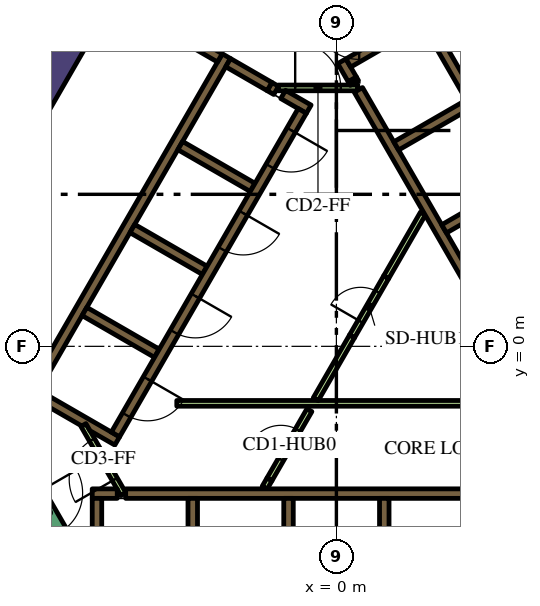
"""IFC4 building model, lengths in metres.
Left out: names, types, materials, properties, quantities, classifications, styles, units other than length and angle.
Written with IfcOpenShell. Run it as: python <this file> out.ifc"""

import sys

from ifc_helpers import new_model, si_unit, direction, frame, frame_2d, origin, place, context, subcontext, project, spatial, polyline, rectangle, outline, extrude, element, fill, save


model = new_model("IFC4")
c1 = context("Model", 3, precision=1e-05, world=origin(), true_north=direction((0.0, 1.0)))
c2 = subcontext(c1, "Body", "Model", "MODEL_VIEW")
j1 = project(units=[si_unit("LENGTHUNIT", "METRE"), si_unit("PLANEANGLEUNIT", "RADIAN")], contexts=[c1])
p1 = place(None, origin())
s1 = spatial("IfcSite", under=j1, at=p1, CompositionType="ELEMENT")
p2 = place(p1, origin())
s2 = spatial("IfcBuilding", under=s1, at=p2, CompositionType="ELEMENT")
p3 = place(p2, frame((0.0, 0.0, 175.2)))
s3 = spatial("IfcBuildingStorey", under=s2, at=p3, CompositionType="ELEMENT", Elevation=175.2)
p4 = place(p3, frame((8.279, 5.761, 0.0), z_axis=(0.0, 0.0, 1.0), x_axis=(-0.500010359015, 0.866019422922, 0.0)))
e1 = element("IfcWall", 1, at=p4, inside=s3, PredefinedType="SOLIDWALL", context=c2, shape_type="SweptSolid", body=[
    extrude(rectangle(XDim=12.528, YDim=0.8, at=frame_2d((6.264, 0.0))), origin(), (0.0, 0.0, 1.0), 4.2),
])
p5 = place(p3, frame((-12.668, -1.842, 0.0), z_axis=(0.0, 0.0, 1.0), x_axis=(0.500003640647, 0.866023301845, 0.0)))
e2 = element("IfcWall", 2, at=p5, inside=s3, PredefinedType="SOLIDWALL", context=c2, shape_type="SweptSolid", body=[
    extrude(rectangle(XDim=15.858, YDim=0.8, at=frame_2d((7.929, 0.0))), origin(), (0.0, 0.0, 1.0), 4.2),
])
p6 = place(p3, frame((-5.545, -3.875, 0.0), z_axis=(0.0, 0.0, 1.0), x_axis=(1.0, 0.0, 0.0)))
e3 = element("IfcWall", 3, at=p6, inside=s3, PredefinedType="SOLIDWALL", context=c2, shape_type="SweptSolid", body=[
    extrude(rectangle(XDim=11.97, YDim=0.25, at=frame_2d((5.985, 0.0))), origin(), (0.0, 0.0, 1.0), 4.2),
])
p7 = place(p3, frame((-6.425, -3.875, 0.0), z_axis=(0.0, 0.0, 1.0), x_axis=(1.0, 0.0, 0.0)))
e4 = element("IfcWall", 4, at=p7, inside=s3, PredefinedType="SOLIDWALL", context=c2, shape_type="SweptSolid", body=[
    extrude(rectangle(XDim=0.658, YDim=0.25, at=frame_2d((0.329, 0.0))), origin(), (0.0, 0.0, 1.0), 4.2),
])
for number, where, z_axis, x_axis in (
    (5, (1.26, -4.0, 0.0), (0.0, 0.0, 1.0), (0.0, -1.0, 0.0)),
    (6, (-1.26, -4.0, 0.0), (0.0, 0.0, 1.0), (0.0, -1.0, 0.0)),
    (7, (-3.78, -4.0, 0.0), (0.0, 0.0, 1.0), (0.0, -1.0, 0.0)),
):
    element("IfcWall", number, at=place(p3, frame(where, z_axis=z_axis, x_axis=x_axis)), inside=s3, PredefinedType="SOLIDWALL", context=c2, shape_type="SweptSolid", body=[
        extrude(rectangle(XDim=2.2, YDim=0.25, at=frame_2d((1.1, 0.0))), origin(), (0.0, 0.0, 1.0), 4.2),
    ])
p8 = place(p3, frame((-6.3, -7.125, 0.0), z_axis=(0.0, 0.0, 1.0), x_axis=(0.0, 1.0, 0.0)))
e8 = element("IfcWall", 8, at=p8, inside=s3, PredefinedType="SOLIDWALL", context=c2, shape_type="SweptSolid", body=[
    extrude(rectangle(XDim=3.125, YDim=0.25, at=frame_2d((1.562, 0.0))), origin(), (0.0, 0.0, 1.0), 4.2),
])
p9 = place(p3, frame((0.473, 6.93, 0.0), z_axis=(0.0, 0.0, 1.0), x_axis=(-0.49972245349, 0.866185586049, 0.0)))
e9 = element("IfcWall", 9, at=p9, inside=s3, PredefinedType="SOLIDWALL", context=c2, shape_type="SweptSolid", body=[
    extrude(rectangle(XDim=0.11, YDim=0.25, at=frame_2d((0.055, 0.0))), origin(), (0.0, 0.0, 1.0), 4.2),
])
p10 = place(p3, frame((6.568, -3.627, 0.0), z_axis=(0.0, 0.0, 1.0), x_axis=(-0.499999455981, 0.866025717874, 0.0)))
e10 = element("IfcWall", 10, at=p10, inside=s3, PredefinedType="SOLIDWALL", context=c2, shape_type="SweptSolid", body=[
    extrude(rectangle(XDim=11.978, YDim=0.25, at=frame_2d((5.989, 0.0))), origin(), (0.0, 0.0, 1.0), 4.2),
])
p11 = place(p3, frame((0.417, 7.027, 0.0), z_axis=(0.0, 0.0, 1.0), x_axis=(-0.500210807569, 0.865903659763, 0.0)))
e11 = element("IfcWall", 11, at=p11, inside=s3, PredefinedType="SOLIDWALL", context=c2, shape_type="SweptSolid", body=[
    extrude(rectangle(XDim=0.548, YDim=0.25, at=frame_2d((0.274, 0.0))), origin(), (0.0, 0.0, 1.0), 4.2),
])
p12 = place(p3, frame((3.1, 9.064, 0.0), z_axis=(0.0, 0.0, 1.0), x_axis=(-0.866030133475, -0.499991807846, 0.0)))
e12 = element("IfcWall", 12, at=p12, inside=s3, PredefinedType="SOLIDWALL", context=c2, shape_type="SweptSolid", body=[
    extrude(rectangle(XDim=3.217, YDim=0.25, at=frame_2d((1.608, 0.0))), origin(), (0.0, 0.0, 1.0), 4.2),
])
p13 = place(p3, frame((1.574, 5.274, 0.0), z_axis=(0.0, 0.0, 1.0), x_axis=(0.866028486751, 0.499994660107, 0.0)))
e13 = element("IfcWall", 13, at=p13, inside=s3, PredefinedType="SOLIDWALL", context=c2, shape_type="SweptSolid", body=[
    extrude(rectangle(XDim=2.2, YDim=0.25, at=frame_2d((1.1, 0.0))), origin(), (0.0, 0.0, 1.0), 4.2),
])
p14 = place(p3, frame((2.834, 3.091, 0.0), z_axis=(0.0, 0.0, 1.0), x_axis=(0.866008176907, 0.50002983664, 0.0)))
e14 = element("IfcWall", 14, at=p14, inside=s3, PredefinedType="SOLIDWALL", context=c2, shape_type="SweptSolid", body=[
    extrude(rectangle(XDim=2.2, YDim=0.25, at=frame_2d((1.1, 0.0))), origin(), (0.0, 0.0, 1.0), 4.2),
])
p15 = place(p3, frame((-8.06, -1.311, 0.0), z_axis=(0.0, 0.0, 1.0), x_axis=(0.50000273126, 0.866023826885, 0.0)))
e15 = element("IfcWall", 15, at=p15, inside=s3, PredefinedType="SOLIDWALL", context=c2, shape_type="SweptSolid", body=[
    extrude(rectangle(XDim=10.33, YDim=0.25, at=frame_2d((5.165, 0.0))), origin(), (0.0, 0.0, 1.0), 4.2),
])
p16 = place(p3, frame((-1.758, 6.835, 0.0), z_axis=(0.0, 0.0, 1.0), x_axis=(0.865982457891, -0.500074377092, 0.0)))
e16 = element("IfcWall", 16, at=p16, inside=s3, PredefinedType="SOLIDWALL", context=c2, shape_type="SweptSolid", body=[
    extrude(rectangle(XDim=0.2, YDim=0.25, at=frame_2d((0.1, 0.0))), origin(), (0.0, 0.0, 1.0), 4.2),
])
p17 = place(p3, frame((-1.76, 6.836, 0.0), z_axis=(0.0, 0.0, 1.0), x_axis=(-0.865952863304, 0.500125622755, 0.0)))
e17 = element("IfcWall", 17, at=p17, inside=s3, PredefinedType="SOLIDWALL", context=c2, shape_type="SweptSolid", body=[
    extrude(rectangle(XDim=1.258, YDim=0.25, at=frame_2d((0.629, 0.0))), origin(), (0.0, 0.0, 1.0), 4.2),
])
p18 = place(p3, frame((-0.728, 6.24, 0.0), z_axis=(0.0, 0.0, 1.0), x_axis=(-0.865955664968, 0.500120771724, 0.0)))
e18 = element("IfcWall", 18, at=p18, inside=s3, PredefinedType="SOLIDWALL", context=c2, shape_type="SweptSolid", body=[
    extrude(rectangle(XDim=0.778, YDim=0.25, at=frame_2d((0.389, 0.0))), origin(), (0.0, 0.0, 1.0), 4.2),
])
for number, where, z_axis, x_axis in (
    (19, (-2.204, 4.182, 0.0), (0.0, 0.0, 1.0), (-0.866, 0.5, 0.0)),
    (20, (-5.369, 3.1, 0.0), (0.0, 0.0, 1.0), (0.866, -0.5, 0.0)),
    (21, (-4.724, -0.182, 0.0), (0.0, 0.0, 1.0), (-0.866, 0.5, 0.0)),
):
    element("IfcWall", number, at=place(p3, frame(where, z_axis=z_axis, x_axis=x_axis)), inside=s3, PredefinedType="SOLIDWALL", context=c2, shape_type="SweptSolid", body=[
        extrude(rectangle(XDim=2.2, YDim=0.25, at=frame_2d((1.1, 0.0))), origin(), (0.0, 0.0, 1.0), 4.2),
    ])
p19 = place(p3, origin())
e22 = element("IfcWall", 22, at=p19, inside=s3, PredefinedType="SOLIDWALL", context=c2, shape_type="SweptSolid", body=[
    extrude(outline(polyline([(-5.922, -2.257), (-5.922, -2.257), (-5.705, -2.382), (-5.83, -2.598), (-6.483, -2.221), (-6.591, -2.033), (-6.591, -2.033), (-6.7, -2.096), (-7.952, -1.373), (-7.827, -1.156), (-5.922, -2.257)])), origin(), (0.0, 0.0, 1.0), 4.2),
])
p20 = place(p3, frame((-3.066, 7.59, 0.0), z_axis=(0.0, 0.0, 1.0), x_axis=(-0.866081358704, 0.49990307071, 0.0)))
e23 = element("IfcWall", 23, at=p20, inside=s3, PredefinedType="SOLIDWALL", context=c2, shape_type="SweptSolid", body=[
    extrude(rectangle(XDim=0.858, YDim=0.25, at=frame_2d((0.429, 0.0))), origin(), (0.0, 0.0, 1.0), 4.2),
])
p21 = place(p3, frame((-4.2, -1.5, 0.0), z_axis=(0.0, 0.0, 1.0), x_axis=(1.0, 0.0, 0.0)))
e24 = element("IfcWall", 24, at=p21, inside=s3, PredefinedType="PARTITIONING", context=c2, shape_type="SweptSolid", body=[
    extrude(rectangle(XDim=9.359, YDim=0.15, at=frame_2d((4.68, 0.0))), origin(), (0.0, 0.0, 1.0), 3.15),
])
p22 = place(p3, frame((-0.544, -1.393, 0.0), z_axis=(0.0, 0.0, 1.0), x_axis=(0.499928740635, 0.866066541489, 0.0)))
e25 = element("IfcWall", 25, at=p22, inside=s3, PredefinedType="PARTITIONING", context=c2, shape_type="SweptSolid", body=[
    extrude(rectangle(XDim=1.912, YDim=0.15, at=frame_2d((0.956, 0.0))), origin(), (0.0, 0.0, 1.0), 3.15),
])
p23 = place(p3, frame((1.312, 1.822, 0.0), z_axis=(0.0, 0.0, 1.0), x_axis=(0.500003549559, 0.866023354436, 0.0)))
e26 = element("IfcWall", 26, at=p23, inside=s3, PredefinedType="PARTITIONING", context=c2, shape_type="SweptSolid", body=[
    extrude(rectangle(XDim=1.93, YDim=0.15, at=frame_2d((0.965, 0.0))), origin(), (0.0, 0.0, 1.0), 3.15),
])
p24 = place(p3, frame((-1.887, -3.718, 0.0), z_axis=(0.0, 0.0, 1.0), x_axis=(0.500165633897, 0.865929753888, 0.0)))
e27 = element("IfcWall", 27, at=p24, inside=s3, PredefinedType="PARTITIONING", context=c2, shape_type="SweptSolid", body=[
    extrude(rectangle(XDim=0.254, YDim=0.15, at=frame_2d((0.127, 0.0))), origin(), (0.0, 0.0, 1.0), 3.15),
])
p25 = place(p3, frame((8.565, -2.185, 0.0), z_axis=(0.0, 0.0, 1.0), x_axis=(-0.499997954832, 0.866026584559, 0.0)))
e28 = element("IfcWall", 28, at=p25, inside=s3, PredefinedType="SOLIDWALL", context=c2, shape_type="SweptSolid", body=[
    extrude(rectangle(XDim=12.35, YDim=0.25, at=frame_2d((6.175, 0.0))), origin(), (0.0, 0.0, 1.0), 4.2),
])
p26 = place(p25, frame((0.585, 0.0, 0.0)))
e29 = element("IfcOpeningElement", 29, at=p26, cuts=e28, PredefinedType="OPENING", context=c2, shape_type="SweptSolid", body=[
    extrude(rectangle(XDim=1.1, YDim=2.1, at=frame_2d((0.55, 1.05))), frame((0.0, 0.135, 0.0), z_axis=(0.0, -1.0, 0.0), x_axis=(1.0, 0.0, 0.0)), (0.0, 0.0, 1.0), 0.27),
])
p27 = place(p3, frame((-0.898, 6.194, 0.0), z_axis=(0.0, 0.0, 1.0), x_axis=(-0.499996202215, -0.866027596426, 0.0)))
e30 = element("IfcWall", 30, at=p27, inside=s3, PredefinedType="SOLIDWALL", context=c2, shape_type="SweptSolid", body=[
    extrude(rectangle(XDim=9.83, YDim=0.25, at=frame_2d((4.915, 0.0))), origin(), (0.0, 0.0, 1.0), 4.2),
])
p28 = place(p27, frame((0.585, 0.0, 0.0)))
e31 = element("IfcOpeningElement", 31, at=p28, cuts=e30, PredefinedType="OPENING", context=c2, shape_type="SweptSolid", body=[
    extrude(rectangle(XDim=1.1, YDim=2.1, at=frame_2d((0.55, 1.05))), frame((0.0, 0.135, 0.0), z_axis=(0.0, -1.0, 0.0), x_axis=(1.0, 0.0, 0.0)), (0.0, 0.0, 1.0), 0.27),
])
p29 = place(p27, frame((3.105, 0.0, 0.0)))
e32 = element("IfcOpeningElement", 32, at=p29, cuts=e30, PredefinedType="OPENING", context=c2, shape_type="SweptSolid", body=[
    extrude(rectangle(XDim=1.1, YDim=2.1, at=frame_2d((0.55, 1.05))), frame((0.0, 0.135, 0.0), z_axis=(0.0, -1.0, 0.0), x_axis=(1.0, 0.0, 0.0)), (0.0, 0.0, 1.0), 0.27),
])
p30 = place(p27, frame((5.625, 0.0, 0.0)))
e33 = element("IfcOpeningElement", 33, at=p30, cuts=e30, PredefinedType="OPENING", context=c2, shape_type="SweptSolid", body=[
    extrude(rectangle(XDim=1.1, YDim=2.1, at=frame_2d((0.55, 1.05))), frame((0.0, 0.135, 0.0), z_axis=(0.0, -1.0, 0.0), x_axis=(1.0, 0.0, 0.0)), (0.0, 0.0, 1.0), 0.27),
])
p31 = place(p27, frame((8.145, 0.0, 0.0)))
e34 = element("IfcOpeningElement", 34, at=p31, cuts=e30, PredefinedType="OPENING", context=c2, shape_type="SweptSolid", body=[
    extrude(rectangle(XDim=1.1, YDim=2.1, at=frame_2d((0.55, 1.05))), frame((0.0, 0.135, 0.0), z_axis=(0.0, -1.0, 0.0), x_axis=(1.0, 0.0, 0.0)), (0.0, 0.0, 1.0), 0.27),
])
p32 = place(p3, frame((-8.103, -3.466, 0.0), z_axis=(0.0, 0.0, 1.0), x_axis=(0.500078061341, -0.865980330357, 0.0)))
e35 = element("IfcWall", 35, at=p32, inside=s3, PredefinedType="SOLIDWALL", context=c2, shape_type="SweptSolid", body=[
    extrude(rectangle(XDim=2.1, YDim=0.4, at=frame_2d((1.05, 0.0))), origin(), (0.0, 0.0, 1.0), 4.2),
])
p33 = place(p32, frame((0.45, 0.0, 0.0)))
e36 = element("IfcOpeningElement", 36, at=p33, cuts=e35, PredefinedType="OPENING", context=c2, shape_type="SweptSolid", body=[
    extrude(rectangle(XDim=1.2, YDim=2.1, at=frame_2d((0.6, 1.05))), frame((0.0, 0.21, 0.0), z_axis=(0.0, -1.0, 0.0), x_axis=(1.0, 0.0, 0.0)), (0.0, 0.0, 1.0), 0.42),
])
p34 = place(p3, frame((-1.76, -3.498, 0.0), z_axis=(0.0, 0.0, 1.0), x_axis=(0.499977374825, 0.866038466041, 0.0)))
e37 = element("IfcWall", 37, at=p34, inside=s3, PredefinedType="PARTITIONING", context=c2, shape_type="SweptSolid", body=[
    extrude(rectangle(XDim=2.1, YDim=0.15, at=frame_2d((1.05, 0.0))), origin(), (0.0, 0.0, 1.0), 3.15),
])
p35 = place(p34, frame((0.6, 0.0, 0.0)))
e38 = element("IfcOpeningElement", 38, at=p35, cuts=e37, PredefinedType="OPENING", context=c2, shape_type="SweptSolid", body=[
    extrude(rectangle(XDim=0.9, YDim=2.1, at=frame_2d((0.45, 1.05))), frame((0.0, 0.085, 0.0), z_axis=(0.0, -1.0, 0.0), x_axis=(1.0, 0.0, 0.0)), (0.0, 0.0, 1.0), 0.17),
])
p36 = place(p3, frame((-1.534, 6.8, 0.0), z_axis=(0.0, 0.0, 1.0), x_axis=(1.0, 0.0, 0.0)))
e39 = element("IfcWall", 39, at=p36, inside=s3, PredefinedType="PARTITIONING", context=c2, shape_type="SweptSolid", body=[
    extrude(rectangle(XDim=2.1, YDim=0.15, at=frame_2d((1.05, 0.0))), origin(), (0.0, 0.0, 1.0), 3.15),
])
p37 = place(p36, frame((0.45, 0.0, 0.0)))
e40 = element("IfcOpeningElement", 40, at=p37, cuts=e39, PredefinedType="OPENING", context=c2, shape_type="SweptSolid", body=[
    extrude(rectangle(XDim=1.2, YDim=2.1, at=frame_2d((0.6, 1.05))), frame((0.0, 0.085, 0.0), z_axis=(0.0, -1.0, 0.0), x_axis=(1.0, 0.0, 0.0)), (0.0, 0.0, 1.0), 0.17),
])
p38 = place(p3, frame((-5.606, -3.89, 0.0), z_axis=(0.0, 0.0, 1.0), x_axis=(-0.500027713859, 0.866009402589, 0.0)))
e41 = element("IfcWall", 41, at=p38, inside=s3, PredefinedType="PARTITIONING", context=c2, shape_type="SweptSolid", body=[
    extrude(rectangle(XDim=2.1, YDim=0.15, at=frame_2d((1.05, 0.0))), origin(), (0.0, 0.0, 1.0), 3.15),
])
p39 = place(p38, frame((0.45, 0.0, 0.0)))
e42 = element("IfcOpeningElement", 42, at=p39, cuts=e41, PredefinedType="OPENING", context=c2, shape_type="SweptSolid", body=[
    extrude(rectangle(XDim=1.2, YDim=2.1, at=frame_2d((0.6, 1.05))), frame((0.0, 0.085, 0.0), z_axis=(0.0, -1.0, 0.0), x_axis=(1.0, 0.0, 0.0)), (0.0, 0.0, 1.0), 0.17),
])
p40 = place(p3, frame((0.412, 0.263, 0.0), z_axis=(0.0, 0.0, 1.0), x_axis=(0.500062916607, 0.865989075817, 0.0)))
e43 = element("IfcWall", 43, at=p40, inside=s3, PredefinedType="PARTITIONING", context=c2, shape_type="SweptSolid", body=[
    extrude(rectangle(XDim=1.8, YDim=0.15, at=frame_2d((0.9, 0.0))), origin(), (0.0, 0.0, 1.0), 3.15),
])
p41 = place(p40, frame((0.45, 0.0, 0.0)))
e44 = element("IfcOpeningElement", 44, at=p41, cuts=e43, PredefinedType="OPENING", context=c2, shape_type="SweptSolid", body=[
    extrude(rectangle(XDim=0.9, YDim=2.1, at=frame_2d((0.45, 1.05))), frame((0.0, 0.085, 0.0), z_axis=(0.0, -1.0, 0.0), x_axis=(1.0, 0.0, 0.0)), (0.0, 0.0, 1.0), 0.17),
])
p42 = place(p28, origin())
e45 = element("IfcDoor", 45, at=p42, inside=s3, OperationType="DOUBLE_DOOR_SLIDING", PredefinedType="DOOR", context=c2, shape_type="SweptSolid", body=[
    extrude(rectangle(XDim=1.1, YDim=2.1, at=frame_2d((0.55, 1.05))), frame((0.0, 0.025, 0.0), z_axis=(0.0, -1.0, 0.0), x_axis=(1.0, 0.0, 0.0)), (0.0, 0.0, 1.0), 0.05),
])
fill(e31, e45)
p43 = place(p29, origin())
e46 = element("IfcDoor", 46, at=p43, inside=s3, OperationType="DOUBLE_DOOR_SLIDING", PredefinedType="DOOR", context=c2, shape_type="SweptSolid", body=[
    extrude(rectangle(XDim=1.1, YDim=2.1, at=frame_2d((0.55, 1.05))), frame((0.0, 0.025, 0.0), z_axis=(0.0, -1.0, 0.0), x_axis=(1.0, 0.0, 0.0)), (0.0, 0.0, 1.0), 0.05),
])
fill(e32, e46)
p44 = place(p30, origin())
e47 = element("IfcDoor", 47, at=p44, inside=s3, OperationType="DOUBLE_DOOR_SLIDING", PredefinedType="DOOR", context=c2, shape_type="SweptSolid", body=[
    extrude(rectangle(XDim=1.1, YDim=2.1, at=frame_2d((0.55, 1.05))), frame((0.0, 0.025, 0.0), z_axis=(0.0, -1.0, 0.0), x_axis=(1.0, 0.0, 0.0)), (0.0, 0.0, 1.0), 0.05),
])
fill(e33, e47)
p45 = place(p31, origin())
e48 = element("IfcDoor", 48, at=p45, inside=s3, OperationType="DOUBLE_DOOR_SLIDING", PredefinedType="DOOR", context=c2, shape_type="SweptSolid", body=[
    extrude(rectangle(XDim=1.1, YDim=2.1, at=frame_2d((0.55, 1.05))), frame((0.0, 0.025, 0.0), z_axis=(0.0, -1.0, 0.0), x_axis=(1.0, 0.0, 0.0)), (0.0, 0.0, 1.0), 0.05),
])
fill(e34, e48)
p46 = place(p33, origin())
e49 = element("IfcDoor", 49, at=p46, inside=s3, OperationType="SINGLE_SWING_LEFT", PredefinedType="DOOR", context=c2, shape_type="SweptSolid", body=[
    extrude(rectangle(XDim=1.2, YDim=2.1, at=frame_2d((0.6, 1.05))), frame((0.0, 0.025, 0.0), z_axis=(0.0, -1.0, 0.0), x_axis=(1.0, 0.0, 0.0)), (0.0, 0.0, 1.0), 0.05),
])
fill(e36, e49)
p47 = place(p35, origin())
e50 = element("IfcDoor", 50, at=p47, inside=s3, OperationType="SINGLE_SWING_LEFT", PredefinedType="DOOR", context=c2, shape_type="SweptSolid", body=[
    extrude(rectangle(XDim=0.9, YDim=2.1, at=frame_2d((0.45, 1.05))), frame((0.0, 0.025, 0.0), z_axis=(0.0, -1.0, 0.0), x_axis=(1.0, 0.0, 0.0)), (0.0, 0.0, 1.0), 0.05),
])
fill(e38, e50)
p48 = place(p37, origin())
e51 = element("IfcDoor", 51, at=p48, inside=s3, OperationType="SINGLE_SWING_LEFT", PredefinedType="DOOR", context=c2, shape_type="SweptSolid", body=[
    extrude(rectangle(XDim=1.2, YDim=2.1, at=frame_2d((0.6, 1.05))), frame((0.0, 0.025, 0.0), z_axis=(0.0, -1.0, 0.0), x_axis=(1.0, 0.0, 0.0)), (0.0, 0.0, 1.0), 0.05),
])
fill(e40, e51)
p49 = place(p39, origin())
e52 = element("IfcDoor", 52, at=p49, inside=s3, OperationType="SINGLE_SWING_LEFT", PredefinedType="DOOR", context=c2, shape_type="SweptSolid", body=[
    extrude(rectangle(XDim=1.2, YDim=2.1, at=frame_2d((0.6, 1.05))), frame((0.0, 0.025, 0.0), z_axis=(0.0, -1.0, 0.0), x_axis=(1.0, 0.0, 0.0)), (0.0, 0.0, 1.0), 0.05),
])
fill(e42, e52)
p50 = place(p41, origin())
e53 = element("IfcDoor", 53, at=p50, inside=s3, OperationType="SINGLE_SWING_LEFT", PredefinedType="DOOR", context=c2, shape_type="SweptSolid", body=[
    extrude(rectangle(XDim=0.9, YDim=2.1, at=frame_2d((0.45, 1.05))), frame((0.0, 0.025, 0.0), z_axis=(0.0, -1.0, 0.0), x_axis=(1.0, 0.0, 0.0)), (0.0, 0.0, 1.0), 0.05),
])
fill(e44, e53)
save(model, sys.argv[1])
